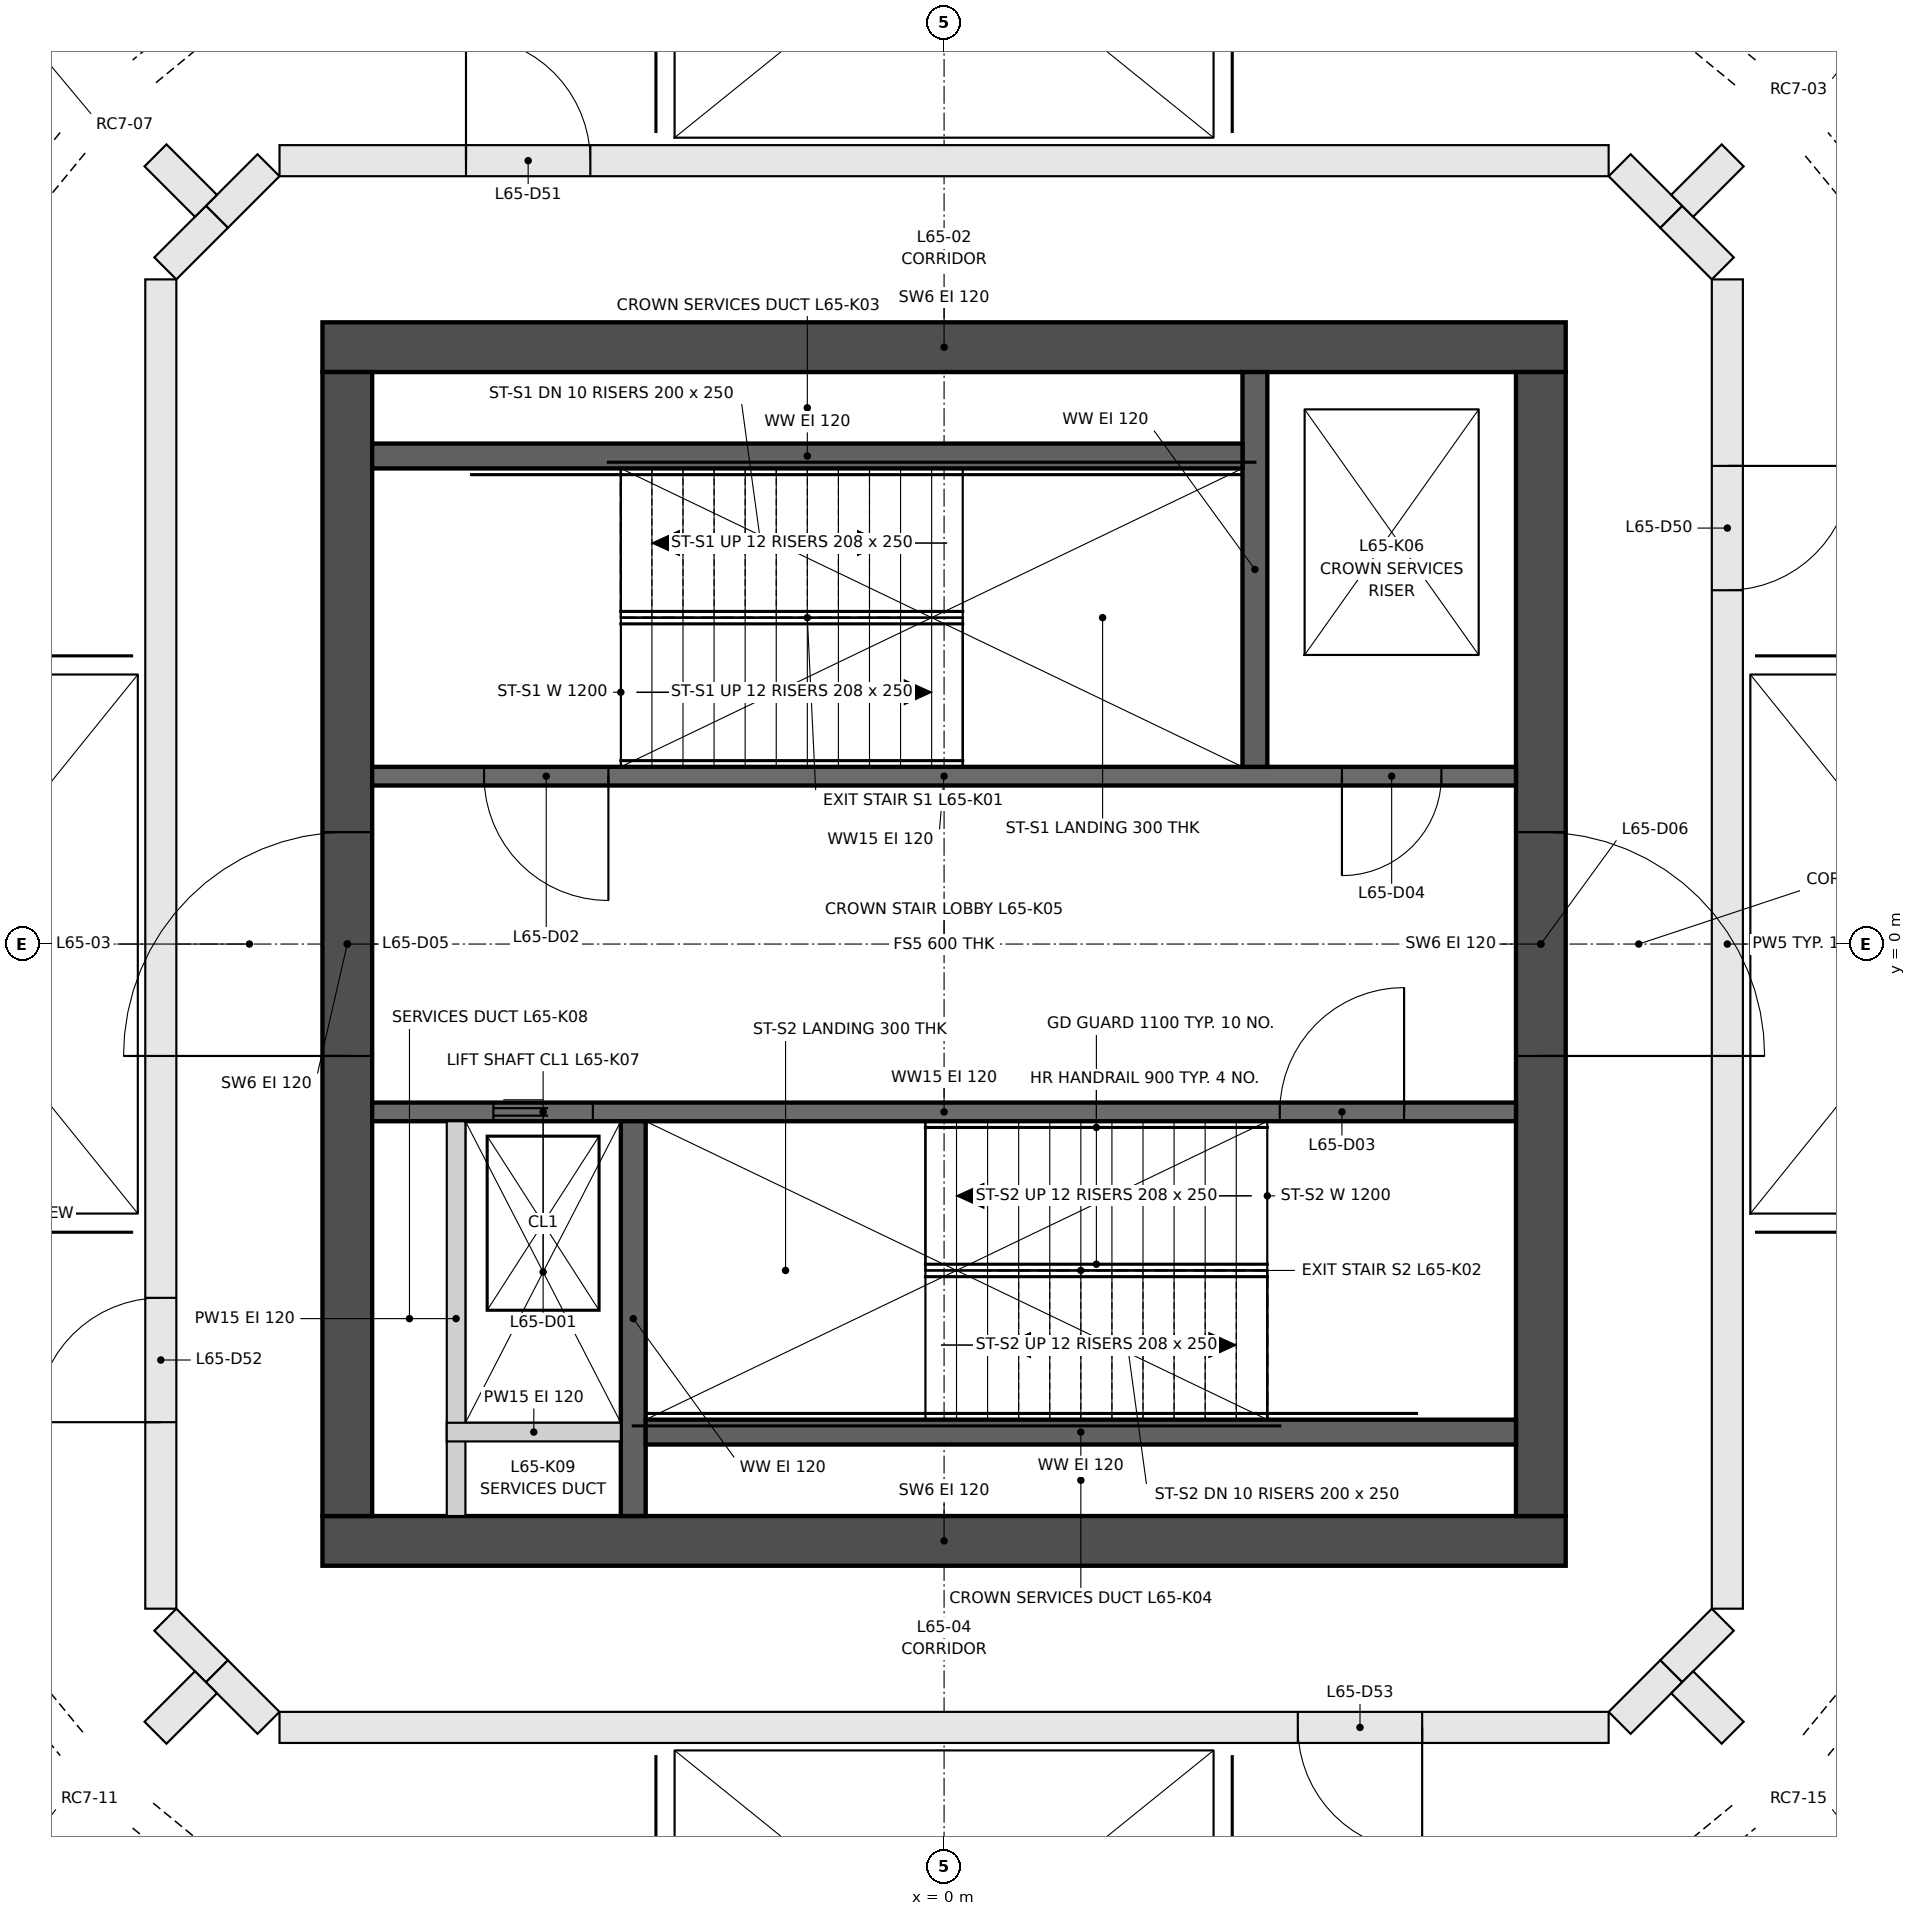
"""IFC4 building model, lengths in metres.
Left out: names, types, materials, properties, quantities, classifications, styles, units other than length and angle.
Written with IfcOpenShell. Run it as: python <this file> out.ifc"""

import sys

from ifc_helpers import new_model, si_unit, direction, frame, frame_2d, origin, origin_2d, place, context, subcontext, project, spatial, rectangle, extrude, element, fill, save


model = new_model("IFC4")
c1 = context("Model", 3, precision=1e-05, world=origin(), true_north=direction((0.0, 1.0)))
c2 = subcontext(c1, "Body", "Model", "MODEL_VIEW")
j1 = project(units=[si_unit("LENGTHUNIT", "METRE"), si_unit("PLANEANGLEUNIT", "RADIAN")], contexts=[c1])
p1 = place(None, origin())
s1 = spatial("IfcSite", under=j1, at=p1, CompositionType="ELEMENT")
p2 = place(p1, origin())
s2 = spatial("IfcBuilding", under=s1, at=p2, CompositionType="ELEMENT")
p3 = place(p2, frame((0.0, 0.0, 239.4)))
s3 = spatial("IfcBuildingStorey", under=s2, at=p3, CompositionType="ELEMENT", Elevation=239.4)
for number, where, z_axis, x_axis in (
    (1, (7.792, 7.792, 0.5), (0.0, 0.0, 1.0), (0.707, -0.707, 0.0)),
    (2, (-7.792, 7.792, 0.5), (0.0, 0.0, 1.0), (0.707, 0.707, 0.0)),
    (3, (-7.792, -7.792, 0.5), (0.0, 0.0, 1.0), (-0.707, 0.707, 0.0)),
    (4, (7.792, -7.792, 0.5), (0.0, 0.0, 1.0), (-0.707, -0.707, 0.0)),
):
    element("IfcColumn", number, at=place(p3, frame(where, z_axis=z_axis, x_axis=x_axis)), inside=s3, PredefinedType="COLUMN", context=c2, shape_type="SweptSolid", body=[
        extrude(rectangle(XDim=0.8, YDim=0.8, at=origin_2d()), origin(), (0.0, -0.339, 0.941), 4.251),
    ])
for number, where, z_axis, x_axis in (
    (5, (-5.0, -4.8, 0.0), (0.0, 0.0, 1.0), (1.0, 0.0, 0.0)),
    (6, (-5.0, 4.8, 0.0), (0.0, 0.0, 1.0), (1.0, 0.0, 0.0)),
):
    element("IfcWall", number, at=place(p3, frame(where, z_axis=z_axis, x_axis=x_axis)), inside=s3, PredefinedType="SHEAR", context=c2, shape_type="SweptSolid", body=[
        extrude(rectangle(XDim=10.0, YDim=0.4, at=frame_2d((5.0, 0.0))), origin(), (0.0, 0.0, 1.0), 4.65),
    ])
p4 = place(p3, frame((-4.8, -4.6, 0.0), z_axis=(0.0, 0.0, 1.0), x_axis=(0.0, 1.0, 0.0)))
e7 = element("IfcWall", 7, at=p4, inside=s3, PredefinedType="SHEAR", context=c2, shape_type="SweptSolid", body=[
    extrude(rectangle(XDim=9.2, YDim=0.4, at=frame_2d((4.6, 0.0))), origin(), (0.0, 0.0, 1.0), 4.65),
])
p5 = place(p4, frame((3.7, 0.0, 0.0)))
e8 = element("IfcOpeningElement", 8, at=p5, cuts=e7, PredefinedType="OPENING", context=c2, shape_type="SweptSolid", body=[
    extrude(rectangle(XDim=1.8, YDim=2.1, at=frame_2d((0.9, 1.05))), frame((0.0, 0.21, 0.0), z_axis=(0.0, -1.0, 0.0), x_axis=(1.0, 0.0, 0.0)), (0.0, 0.0, 1.0), 0.42),
])
p6 = place(p3, frame((4.8, -4.6, 0.0), z_axis=(0.0, 0.0, 1.0), x_axis=(0.0, 1.0, 0.0)))
e9 = element("IfcWall", 9, at=p6, inside=s3, PredefinedType="SHEAR", context=c2, shape_type="SweptSolid", body=[
    extrude(rectangle(XDim=9.2, YDim=0.4, at=frame_2d((4.6, 0.0))), origin(), (0.0, 0.0, 1.0), 4.65),
])
p7 = place(p6, frame((3.7, 0.0, 0.0)))
e10 = element("IfcOpeningElement", 10, at=p7, cuts=e9, PredefinedType="OPENING", context=c2, shape_type="SweptSolid", body=[
    extrude(rectangle(XDim=1.8, YDim=2.1, at=frame_2d((0.9, 1.05))), frame((0.0, 0.21, 0.0), z_axis=(0.0, -1.0, 0.0), x_axis=(1.0, 0.0, 0.0)), (0.0, 0.0, 1.0), 0.42),
])
p8 = place(p3, frame((-4.6, 1.35, 0.0), z_axis=(0.0, 0.0, 1.0), x_axis=(1.0, 0.0, 0.0)))
e11 = element("IfcWall", 11, at=p8, inside=s3, PredefinedType="SHEAR", context=c2, shape_type="SweptSolid", body=[
    extrude(rectangle(XDim=9.2, YDim=0.15, at=frame_2d((4.6, 0.0))), origin(), (0.0, 0.0, 1.0), 4.65),
])
p9 = place(p8, frame((0.9, 0.0, 0.0)))
e12 = element("IfcOpeningElement", 12, at=p9, cuts=e11, PredefinedType="OPENING", context=c2, shape_type="SweptSolid", body=[
    extrude(rectangle(XDim=1.0, YDim=2.1, at=frame_2d((0.5, 1.05))), frame((0.0, 0.085, 0.0), z_axis=(0.0, -1.0, 0.0), x_axis=(1.0, 0.0, 0.0)), (0.0, 0.0, 1.0), 0.17),
])
p10 = place(p8, frame((7.8, 0.0, 0.0)))
e13 = element("IfcOpeningElement", 13, at=p10, cuts=e11, PredefinedType="OPENING", context=c2, shape_type="SweptSolid", body=[
    extrude(rectangle(XDim=0.8, YDim=2.1, at=frame_2d((0.4, 1.05))), frame((0.0, 0.085, 0.0), z_axis=(0.0, -1.0, 0.0), x_axis=(1.0, 0.0, 0.0)), (0.0, 0.0, 1.0), 0.17),
])
p11 = place(p3, frame((-4.6, -1.35, 0.0), z_axis=(0.0, 0.0, 1.0), x_axis=(1.0, 0.0, 0.0)))
e14 = element("IfcWall", 14, at=p11, inside=s3, PredefinedType="SHEAR", context=c2, shape_type="SweptSolid", body=[
    extrude(rectangle(XDim=9.2, YDim=0.15, at=frame_2d((4.6, 0.0))), origin(), (0.0, 0.0, 1.0), 4.65),
])
p12 = place(p11, frame((0.975, 0.0, 0.0)))
e15 = element("IfcOpeningElement", 15, at=p12, cuts=e14, PredefinedType="OPENING", context=c2, shape_type="SweptSolid", body=[
    extrude(rectangle(XDim=0.8, YDim=2.1, at=frame_2d((0.4, 1.05))), frame((0.0, 0.085, 0.0), z_axis=(0.0, -1.0, 0.0), x_axis=(1.0, 0.0, 0.0)), (0.0, 0.0, 1.0), 0.17),
])
p13 = place(p11, frame((7.3, 0.0, 0.0)))
e16 = element("IfcOpeningElement", 16, at=p13, cuts=e14, PredefinedType="OPENING", context=c2, shape_type="SweptSolid", body=[
    extrude(rectangle(XDim=1.0, YDim=2.1, at=frame_2d((0.5, 1.05))), frame((0.0, 0.085, 0.0), z_axis=(0.0, -1.0, 0.0), x_axis=(1.0, 0.0, 0.0)), (0.0, 0.0, 1.0), 0.17),
])
for number, where, z_axis, x_axis in (
    (17, (2.5, 1.425, 0.0), (0.0, 0.0, 1.0), (0.0, 1.0, 0.0)),
    (18, (-2.5, -1.425, 0.0), (0.0, 0.0, 1.0), (0.0, -1.0, 0.0)),
):
    element("IfcWall", number, at=place(p3, frame(where, z_axis=z_axis, x_axis=x_axis)), inside=s3, PredefinedType="SHEAR", context=c2, shape_type="SweptSolid", body=[
        extrude(rectangle(XDim=3.175, YDim=0.2, at=frame_2d((1.587, 0.0))), origin(), (0.0, 0.0, 1.0), 4.65),
    ])
for number, where, z_axis, x_axis in (
    (19, (-4.6, 3.925, 0.0), (0.0, 0.0, 1.0), (1.0, 0.0, 0.0)),
    (20, (4.6, -3.925, 0.0), (0.0, 0.0, 1.0), (-1.0, 0.0, 0.0)),
):
    element("IfcWall", number, at=place(p3, frame(where, z_axis=z_axis, x_axis=x_axis)), inside=s3, PredefinedType="SHEAR", context=c2, shape_type="SweptSolid", body=[
        extrude(rectangle(XDim=7.0, YDim=0.2, at=frame_2d((3.5, 0.0))), origin(), (0.0, 0.0, 1.0), 4.65),
    ])
p14 = place(p3, frame((-3.925, -4.6, 0.0), z_axis=(0.0, 0.0, 1.0), x_axis=(0.0, 1.0, 0.0)))
e21 = element("IfcWall", 21, at=p14, inside=s3, PredefinedType="PARTITIONING", context=c2, shape_type="SweptSolid", body=[
    extrude(rectangle(XDim=3.175, YDim=0.15, at=frame_2d((1.587, 0.0))), origin(), (0.0, 0.0, 1.0), 4.65),
])
p15 = place(p3, frame((-4.0, -3.925, 0.0), z_axis=(0.0, 0.0, 1.0), x_axis=(1.0, 0.0, 0.0)))
e22 = element("IfcWall", 22, at=p15, inside=s3, PredefinedType="PARTITIONING", context=c2, shape_type="SweptSolid", body=[
    extrude(rectangle(XDim=1.4, YDim=0.15, at=frame_2d((0.7, 0.0))), origin(), (0.0, 0.0, 1.0), 4.65),
])
for number, where, z_axis, x_axis in (
    (23, (5.848, 5.848, 0.0), (0.0, 0.0, 1.0), (0.707, -0.707, 0.0)),
    (24, (6.263, -5.434, 0.0), (0.0, 0.0, 1.0), (-0.707, -0.707, 0.0)),
):
    element("IfcWall", number, at=place(p3, frame(where, z_axis=z_axis, x_axis=x_axis)), inside=s3, PredefinedType="PARTITIONING", context=c2, shape_type="SweptSolid", body=[
        extrude(rectangle(XDim=0.587, YDim=0.25, at=frame_2d((0.293, 0.0))), origin(), (0.0, 0.0, 1.0), 4.65),
    ])
p16 = place(p3, frame((6.3, 5.345, 0.0), z_axis=(0.0, 0.0, 1.0), x_axis=(0.0, -1.0, 0.0)))
e25 = element("IfcWall", 25, at=p16, inside=s3, PredefinedType="PARTITIONING", context=c2, shape_type="SweptSolid", body=[
    extrude(rectangle(XDim=10.69, YDim=0.25, at=frame_2d((5.345, 0.0))), origin(), (0.0, 0.0, 1.0), 4.65),
])
p17 = place(p16, frame((1.5, 0.0, 0.0)))
e26 = element("IfcOpeningElement", 26, at=p17, cuts=e25, PredefinedType="OPENING", context=c2, shape_type="SweptSolid", body=[
    extrude(rectangle(XDim=1.0, YDim=2.1, at=frame_2d((0.5, 1.05))), frame((0.0, 0.135, 0.0), z_axis=(0.0, -1.0, 0.0), x_axis=(1.0, 0.0, 0.0)), (0.0, 0.0, 1.0), 0.27),
])
p18 = place(p3, frame((-5.848, 5.848, 0.0), z_axis=(0.0, 0.0, 1.0), x_axis=(0.706898716824, 0.707314784344, 0.0)))
e27 = element("IfcWall", 27, at=p18, inside=s3, PredefinedType="PARTITIONING", context=c2, shape_type="SweptSolid", body=[
    extrude(rectangle(XDim=0.587, YDim=0.25, at=frame_2d((0.293, 0.0))), origin(), (0.0, 0.0, 1.0), 4.65),
])
p19 = place(p3, frame((-5.345, 6.3, 0.0), z_axis=(0.0, 0.0, 1.0), x_axis=(1.0, 0.0, 0.0)))
e28 = element("IfcWall", 28, at=p19, inside=s3, PredefinedType="PARTITIONING", context=c2, shape_type="SweptSolid", body=[
    extrude(rectangle(XDim=10.69, YDim=0.25, at=frame_2d((5.345, 0.0))), origin(), (0.0, 0.0, 1.0), 4.65),
])
p20 = place(p19, frame((1.5, 0.0, 0.0)))
e29 = element("IfcOpeningElement", 29, at=p20, cuts=e28, PredefinedType="OPENING", context=c2, shape_type="SweptSolid", body=[
    extrude(rectangle(XDim=1.0, YDim=2.1, at=frame_2d((0.5, 1.05))), frame((0.0, 0.135, 0.0), z_axis=(0.0, -1.0, 0.0), x_axis=(1.0, 0.0, 0.0)), (0.0, 0.0, 1.0), 0.27),
])
p21 = place(p3, frame((5.434, 6.263, 0.0), z_axis=(0.0, 0.0, 1.0), x_axis=(0.706898716824, -0.707314784344, 0.0)))
e30 = element("IfcWall", 30, at=p21, inside=s3, PredefinedType="PARTITIONING", context=c2, shape_type="SweptSolid", body=[
    extrude(rectangle(XDim=0.587, YDim=0.25, at=frame_2d((0.293, 0.0))), origin(), (0.0, 0.0, 1.0), 4.65),
])
p22 = place(p3, frame((-6.3, -5.345, 0.0), z_axis=(0.0, 0.0, 1.0), x_axis=(0.0, 1.0, 0.0)))
e31 = element("IfcWall", 31, at=p22, inside=s3, PredefinedType="PARTITIONING", context=c2, shape_type="SweptSolid", body=[
    extrude(rectangle(XDim=10.69, YDim=0.25, at=frame_2d((5.345, 0.0))), origin(), (0.0, 0.0, 1.0), 4.65),
])
p23 = place(p22, frame((1.5, 0.0, 0.0)))
e32 = element("IfcOpeningElement", 32, at=p23, cuts=e31, PredefinedType="OPENING", context=c2, shape_type="SweptSolid", body=[
    extrude(rectangle(XDim=1.0, YDim=2.1, at=frame_2d((0.5, 1.05))), frame((0.0, 0.135, 0.0), z_axis=(0.0, -1.0, 0.0), x_axis=(1.0, 0.0, 0.0)), (0.0, 0.0, 1.0), 0.27),
])
for number, where, z_axis, x_axis in (
    (33, (-6.263, 5.434, 0.0), (0.0, 0.0, 1.0), (0.707, 0.707, 0.0)),
    (34, (-5.848, -5.848, 0.0), (0.0, 0.0, 1.0), (-0.707, 0.707, 0.0)),
    (35, (-5.434, -6.263, 0.0), (0.0, 0.0, 1.0), (-0.707, 0.707, 0.0)),
):
    element("IfcWall", number, at=place(p3, frame(where, z_axis=z_axis, x_axis=x_axis)), inside=s3, PredefinedType="PARTITIONING", context=c2, shape_type="SweptSolid", body=[
        extrude(rectangle(XDim=0.587, YDim=0.25, at=frame_2d((0.293, 0.0))), origin(), (0.0, 0.0, 1.0), 4.65),
    ])
p24 = place(p3, frame((5.345, -6.3, 0.0), z_axis=(0.0, 0.0, 1.0), x_axis=(-1.0, 0.0, 0.0)))
e36 = element("IfcWall", 36, at=p24, inside=s3, PredefinedType="PARTITIONING", context=c2, shape_type="SweptSolid", body=[
    extrude(rectangle(XDim=10.69, YDim=0.25, at=frame_2d((5.345, 0.0))), origin(), (0.0, 0.0, 1.0), 4.65),
])
p25 = place(p24, frame((1.5, 0.0, 0.0)))
e37 = element("IfcOpeningElement", 37, at=p25, cuts=e36, PredefinedType="OPENING", context=c2, shape_type="SweptSolid", body=[
    extrude(rectangle(XDim=1.0, YDim=2.1, at=frame_2d((0.5, 1.05))), frame((0.0, 0.135, 0.0), z_axis=(0.0, -1.0, 0.0), x_axis=(1.0, 0.0, 0.0)), (0.0, 0.0, 1.0), 0.27),
])
p26 = place(p3, frame((5.848, -5.848, 0.0), z_axis=(0.0, 0.0, 1.0), x_axis=(-0.706898716824, -0.707314784344, 0.0)))
e38 = element("IfcWall", 38, at=p26, inside=s3, PredefinedType="PARTITIONING", context=c2, shape_type="SweptSolid", body=[
    extrude(rectangle(XDim=0.587, YDim=0.25, at=frame_2d((0.293, 0.0))), origin(), (0.0, 0.0, 1.0), 4.65),
])
for number, where, z_axis, x_axis in (
    (39, (5.937, 5.937, 0.0), (0.0, 0.0, 1.0), (0.707, 0.707, 0.0)),
    (40, (6.343, -6.343, 0.0), (0.0, 0.0, 1.0), (-0.707, 0.707, 0.0)),
    (41, (-5.937, 5.937, 0.0), (0.0, 0.0, 1.0), (-0.707, 0.707, 0.0)),
    (42, (-5.937, -5.937, 0.0), (0.0, 0.0, 1.0), (-0.707, -0.707, 0.0)),
):
    element("IfcWall", number, at=place(p3, frame(where, z_axis=z_axis, x_axis=x_axis)), inside=s3, PredefinedType="PARTITIONING", context=c2, shape_type="SweptSolid", body=[
        extrude(rectangle(XDim=0.574, YDim=0.25, at=frame_2d((0.287, 0.0))), origin(), (0.0, 0.0, 1.0), 4.65),
    ])
p27 = place(p12, origin())
e43 = element("IfcDoor", 43, at=p27, inside=s3, OperationType="DOUBLE_DOOR_SLIDING", PredefinedType="DOOR", context=c2, shape_type="SweptSolid", body=[
    extrude(rectangle(XDim=0.8, YDim=2.1, at=frame_2d((0.4, 1.05))), frame((0.0, 0.025, 0.0), z_axis=(0.0, -1.0, 0.0), x_axis=(1.0, 0.0, 0.0)), (0.0, 0.0, 1.0), 0.05),
])
fill(e15, e43)
p28 = place(p9, frame((1.0, 0.0, 0.0), z_axis=(0.0, 0.0, 1.0), x_axis=(-1.0, 0.0, 0.0)))
e44 = element("IfcDoor", 44, at=p28, inside=s3, OperationType="SINGLE_SWING_RIGHT", PredefinedType="DOOR", context=c2, shape_type="SweptSolid", body=[
    extrude(rectangle(XDim=1.0, YDim=2.1, at=frame_2d((0.5, 1.05))), frame((0.0, 0.025, 0.0), z_axis=(0.0, -1.0, 0.0), x_axis=(1.0, 0.0, 0.0)), (0.0, 0.0, 1.0), 0.05),
])
fill(e12, e44)
p29 = place(p13, origin())
e45 = element("IfcDoor", 45, at=p29, inside=s3, OperationType="SINGLE_SWING_RIGHT", PredefinedType="DOOR", context=c2, shape_type="SweptSolid", body=[
    extrude(rectangle(XDim=1.0, YDim=2.1, at=frame_2d((0.5, 1.05))), frame((0.0, 0.025, 0.0), z_axis=(0.0, -1.0, 0.0), x_axis=(1.0, 0.0, 0.0)), (0.0, 0.0, 1.0), 0.05),
])
fill(e16, e45)
p30 = place(p10, frame((0.8, 0.0, 0.0), z_axis=(0.0, 0.0, 1.0), x_axis=(-1.0, 0.0, 0.0)))
e46 = element("IfcDoor", 46, at=p30, inside=s3, OperationType="SINGLE_SWING_LEFT", PredefinedType="DOOR", context=c2, shape_type="SweptSolid", body=[
    extrude(rectangle(XDim=0.8, YDim=2.1, at=frame_2d((0.4, 1.05))), frame((0.0, 0.025, 0.0), z_axis=(0.0, -1.0, 0.0), x_axis=(1.0, 0.0, 0.0)), (0.0, 0.0, 1.0), 0.05),
])
fill(e13, e46)
p31 = place(p5, origin())
e47 = element("IfcDoor", 47, at=p31, inside=s3, OperationType="DOUBLE_DOOR_SINGLE_SWING", PredefinedType="DOOR", context=c2, shape_type="SweptSolid", body=[
    extrude(rectangle(XDim=1.8, YDim=2.1, at=frame_2d((0.9, 1.05))), frame((0.0, 0.025, 0.0), z_axis=(0.0, -1.0, 0.0), x_axis=(1.0, 0.0, 0.0)), (0.0, 0.0, 1.0), 0.05),
])
fill(e8, e47)
p32 = place(p7, frame((1.8, 0.0, 0.0), z_axis=(0.0, 0.0, 1.0), x_axis=(-1.0, 0.0, 0.0)))
e48 = element("IfcDoor", 48, at=p32, inside=s3, OperationType="DOUBLE_DOOR_SINGLE_SWING", PredefinedType="DOOR", context=c2, shape_type="SweptSolid", body=[
    extrude(rectangle(XDim=1.8, YDim=2.1, at=frame_2d((0.9, 1.05))), frame((0.0, 0.025, 0.0), z_axis=(0.0, -1.0, 0.0), x_axis=(1.0, 0.0, 0.0)), (0.0, 0.0, 1.0), 0.05),
])
fill(e10, e48)
p33 = place(p17, origin())
e49 = element("IfcDoor", 49, at=p33, inside=s3, OperationType="SINGLE_SWING_LEFT", PredefinedType="DOOR", context=c2, shape_type="SweptSolid", body=[
    extrude(rectangle(XDim=1.0, YDim=2.1, at=frame_2d((0.5, 1.05))), frame((0.0, 0.025, 0.0), z_axis=(0.0, -1.0, 0.0), x_axis=(1.0, 0.0, 0.0)), (0.0, 0.0, 1.0), 0.05),
])
fill(e26, e49)
p34 = place(p20, origin())
e50 = element("IfcDoor", 50, at=p34, inside=s3, OperationType="SINGLE_SWING_LEFT", PredefinedType="DOOR", context=c2, shape_type="SweptSolid", body=[
    extrude(rectangle(XDim=1.0, YDim=2.1, at=frame_2d((0.5, 1.05))), frame((0.0, 0.025, 0.0), z_axis=(0.0, -1.0, 0.0), x_axis=(1.0, 0.0, 0.0)), (0.0, 0.0, 1.0), 0.05),
])
fill(e29, e50)
p35 = place(p23, origin())
e51 = element("IfcDoor", 51, at=p35, inside=s3, OperationType="SINGLE_SWING_LEFT", PredefinedType="DOOR", context=c2, shape_type="SweptSolid", body=[
    extrude(rectangle(XDim=1.0, YDim=2.1, at=frame_2d((0.5, 1.05))), frame((0.0, 0.025, 0.0), z_axis=(0.0, -1.0, 0.0), x_axis=(1.0, 0.0, 0.0)), (0.0, 0.0, 1.0), 0.05),
])
fill(e32, e51)
p36 = place(p25, origin())
e52 = element("IfcDoor", 52, at=p36, inside=s3, OperationType="SINGLE_SWING_LEFT", PredefinedType="DOOR", context=c2, shape_type="SweptSolid", body=[
    extrude(rectangle(XDim=1.0, YDim=2.1, at=frame_2d((0.5, 1.05))), frame((0.0, 0.025, 0.0), z_axis=(0.0, -1.0, 0.0), x_axis=(1.0, 0.0, 0.0)), (0.0, 0.0, 1.0), 0.05),
])
fill(e37, e52)
save(model, sys.argv[1])
